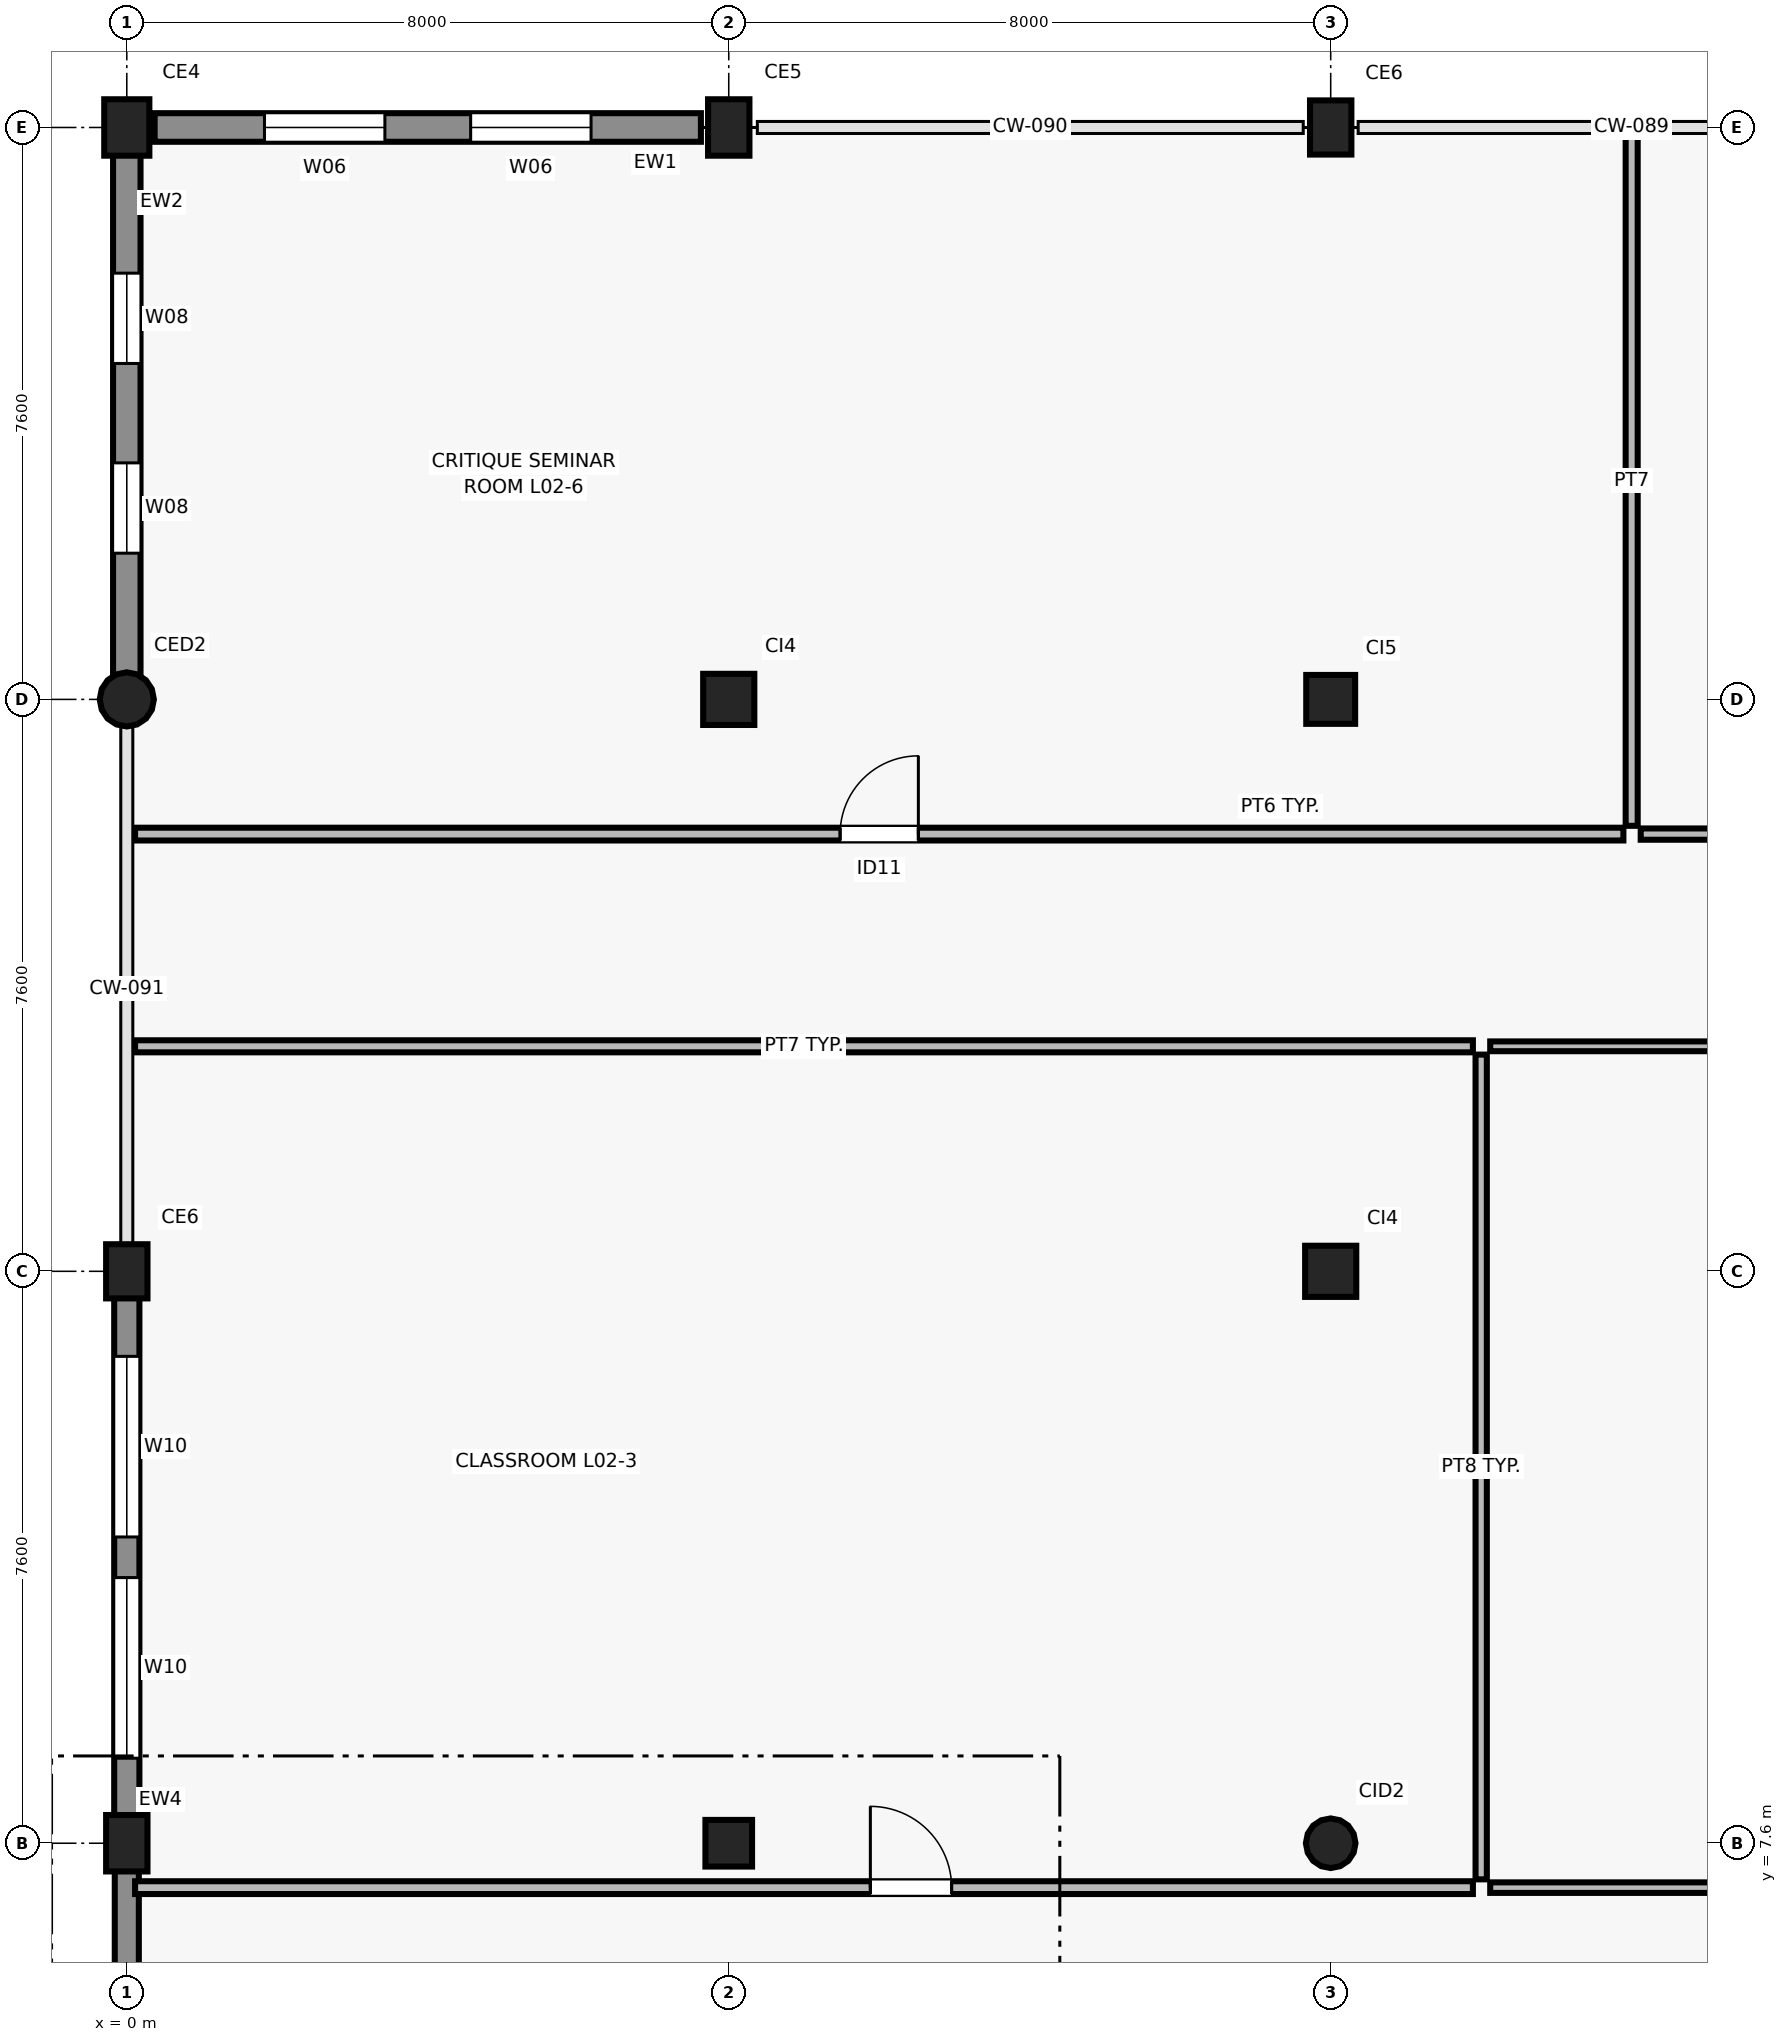
"""IFC4 building model, lengths in metres.
Left out: names, types, materials, properties, quantities, classifications, styles, units other than length and angle.
Written with IfcOpenShell. Run it as: python <this file> out.ifc"""

import sys

from ifc_helpers import new_model, si_unit, direction, frame, frame_2d, origin, origin_2d, place, context, subcontext, project, spatial, rectangle, circle, extrude, element, fill, save


model = new_model("IFC4")
c1 = context("Model", 3, precision=1e-05, world=origin(), true_north=direction((0.0, 1.0)))
c2 = subcontext(c1, "Body", "Model", "MODEL_VIEW")
j1 = project(units=[si_unit("LENGTHUNIT", "METRE"), si_unit("PLANEANGLEUNIT", "RADIAN")], contexts=[c1])
p1 = place(None, origin())
s1 = spatial("IfcSite", under=j1, at=p1, CompositionType="ELEMENT")
p2 = place(p1, origin())
s2 = spatial("IfcBuilding", under=s1, at=p2, CompositionType="ELEMENT")
p3 = place(p2, frame((0.0, 0.0, 9.0)))
s3 = spatial("IfcBuildingStorey", under=s2, at=p3, CompositionType="ELEMENT", Elevation=9.0)
p4 = place(p3, frame((0.0, 7.6, 0.0), z_axis=(0.0, 0.0, 1.0), x_axis=(1.0, 0.0, 0.0)))
e1 = element("IfcColumn", 1, at=p4, inside=s3, PredefinedType="COLUMN", context=c2, shape_type="SweptSolid", body=[
    extrude(rectangle(XDim=0.75, YDim=0.55, at=origin_2d()), origin(), (0.0, 0.0, 1.0), 4.2),
])
p5 = place(p3, frame((0.0, 15.2, 0.0), z_axis=(0.0, 0.0, 1.0), x_axis=(1.0, 0.0, 0.0)))
e2 = element("IfcColumn", 2, at=p5, inside=s3, PredefinedType="COLUMN", context=c2, shape_type="SweptSolid", body=[
    extrude(rectangle(XDim=0.72, YDim=0.55, at=origin_2d()), origin(), (0.0, 0.0, 1.0), 4.2),
])
p6 = place(p3, frame((0.0, 22.8, 0.0), z_axis=(0.0, 0.0, 1.0), x_axis=(1.0, 0.0, 0.0)))
e3 = element("IfcColumn", 3, at=p6, inside=s3, PredefinedType="COLUMN", context=c2, shape_type="SweptSolid", body=[
    extrude(circle(Radius=0.36, at=origin_2d()), origin(), (0.0, 0.0, 1.0), 4.2),
])
p7 = place(p3, frame((0.0, 30.4, 0.0), z_axis=(0.0, 0.0, 1.0), x_axis=(1.0, 0.0, 0.0)))
e4 = element("IfcColumn", 4, at=p7, inside=s3, PredefinedType="COLUMN", context=c2, shape_type="SweptSolid", body=[
    extrude(rectangle(XDim=0.75, YDim=0.6, at=origin_2d()), origin(), (0.0, 0.0, 1.0), 4.2),
])
p8 = place(p3, frame((8.0, 7.6, 0.0), z_axis=(0.0, 0.0, 1.0), x_axis=(1.0, 0.0, 0.0)))
e5 = element("IfcColumn", 5, at=p8, inside=s3, PredefinedType="COLUMN", context=c2, shape_type="SweptSolid", body=[
    extrude(rectangle(XDim=0.62, YDim=0.62, at=origin_2d()), origin(), (0.0, 0.0, 1.0), 4.2),
])
p9 = place(p3, frame((8.0, 22.8, 0.0), z_axis=(0.0, 0.0, 1.0), x_axis=(1.0, 0.0, 0.0)))
e6 = element("IfcColumn", 6, at=p9, inside=s3, PredefinedType="COLUMN", context=c2, shape_type="SweptSolid", body=[
    extrude(rectangle(XDim=0.68, YDim=0.68, at=origin_2d()), origin(), (0.0, 0.0, 1.0), 4.2),
])
p10 = place(p3, frame((8.0, 30.4, 0.0), z_axis=(0.0, 0.0, 1.0), x_axis=(1.0, 0.0, 0.0)))
e7 = element("IfcColumn", 7, at=p10, inside=s3, PredefinedType="COLUMN", context=c2, shape_type="SweptSolid", body=[
    extrude(rectangle(XDim=0.75, YDim=0.55, at=origin_2d()), origin(), (0.0, 0.0, 1.0), 4.2),
])
p11 = place(p3, frame((16.0, 7.6, 0.0), z_axis=(0.0, 0.0, 1.0), x_axis=(1.0, 0.0, 0.0)))
e8 = element("IfcColumn", 8, at=p11, inside=s3, PredefinedType="COLUMN", context=c2, shape_type="SweptSolid", body=[
    extrude(circle(Radius=0.33, at=origin_2d()), origin(), (0.0, 0.0, 1.0), 4.2),
])
p12 = place(p3, frame((16.0, 15.2, 0.0), z_axis=(0.0, 0.0, 1.0), x_axis=(1.0, 0.0, 0.0)))
e9 = element("IfcColumn", 9, at=p12, inside=s3, PredefinedType="COLUMN", context=c2, shape_type="SweptSolid", body=[
    extrude(rectangle(XDim=0.68, YDim=0.68, at=origin_2d()), origin(), (0.0, 0.0, 1.0), 4.2),
])
p13 = place(p3, frame((16.0, 22.8, 0.0), z_axis=(0.0, 0.0, 1.0), x_axis=(1.0, 0.0, 0.0)))
e10 = element("IfcColumn", 10, at=p13, inside=s3, PredefinedType="COLUMN", context=c2, shape_type="SweptSolid", body=[
    extrude(rectangle(XDim=0.65, YDim=0.65, at=origin_2d()), origin(), (0.0, 0.0, 1.0), 4.2),
])
p14 = place(p3, frame((16.0, 30.4, 0.0), z_axis=(0.0, 0.0, 1.0), x_axis=(1.0, 0.0, 0.0)))
e11 = element("IfcColumn", 11, at=p14, inside=s3, PredefinedType="COLUMN", context=c2, shape_type="SweptSolid", body=[
    extrude(rectangle(XDim=0.72, YDim=0.55, at=origin_2d()), origin(), (0.0, 0.0, 1.0), 4.2),
])
p15 = place(p3, frame((7.63, 30.4, 0.0), z_axis=(0.0, 0.0, 1.0), x_axis=(-1.0, 0.0, 0.0)))
e12 = element("IfcWall", 12, at=p15, inside=s3, PredefinedType="SOLIDWALL", context=c2, shape_type="SweptSolid", body=[
    extrude(rectangle(XDim=7.26, YDim=0.38, at=frame_2d((3.63, 0.0))), origin(), (0.0, 0.0, 1.0), 3.27),
])
p16 = place(p15, frame((1.46, 0.0, 0.9)))
e13 = element("IfcOpeningElement", 13, at=p16, cuts=e12, PredefinedType="OPENING", context=c2, shape_type="SweptSolid", body=[
    extrude(rectangle(XDim=1.6, YDim=1.8, at=frame_2d((0.8, 0.9))), frame((0.0, 0.2, 0.0), z_axis=(0.0, -1.0, 0.0), x_axis=(1.0, 0.0, 0.0)), (0.0, 0.0, 1.0), 0.4),
])
p17 = place(p15, frame((4.2, 0.0, 0.9)))
e14 = element("IfcOpeningElement", 14, at=p17, cuts=e12, PredefinedType="OPENING", context=c2, shape_type="SweptSolid", body=[
    extrude(rectangle(XDim=1.6, YDim=1.8, at=frame_2d((0.8, 0.9))), frame((0.0, 0.2, 0.0), z_axis=(0.0, -1.0, 0.0), x_axis=(1.0, 0.0, 0.0)), (0.0, 0.0, 1.0), 0.4),
])
p18 = place(p3, frame((0.0, 30.105, 0.0), z_axis=(0.0, 0.0, 1.0), x_axis=(0.0, -1.0, 0.0)))
e15 = element("IfcWall", 15, at=p18, inside=s3, PredefinedType="SOLIDWALL", context=c2, shape_type="SweptSolid", body=[
    extrude(rectangle(XDim=7.003, YDim=0.365, at=frame_2d((3.501, 0.0))), origin(), (0.0, 0.0, 1.0), 3.4),
])
p19 = place(p18, frame((1.641, 0.0, 0.9)))
e16 = element("IfcOpeningElement", 16, at=p19, cuts=e15, PredefinedType="OPENING", context=c2, shape_type="SweptSolid", body=[
    extrude(rectangle(XDim=1.2, YDim=1.8, at=frame_2d((0.6, 0.9))), frame((0.0, 0.192, 0.0), z_axis=(0.0, -1.0, 0.0), x_axis=(1.0, 0.0, 0.0)), (0.0, 0.0, 1.0), 0.385),
])
p20 = place(p18, frame((4.162, 0.0, 0.9)))
e17 = element("IfcOpeningElement", 17, at=p20, cuts=e15, PredefinedType="OPENING", context=c2, shape_type="SweptSolid", body=[
    extrude(rectangle(XDim=1.2, YDim=1.8, at=frame_2d((0.6, 0.9))), frame((0.0, 0.192, 0.0), z_axis=(0.0, -1.0, 0.0), x_axis=(1.0, 0.0, 0.0)), (0.0, 0.0, 1.0), 0.385),
])
p21 = place(p3, frame((0.0, 14.93, 0.0), z_axis=(0.0, 0.0, 1.0), x_axis=(0.0, -1.0, 0.0)))
e18 = element("IfcWall", 18, at=p21, inside=s3, PredefinedType="SOLIDWALL", context=c2, shape_type="SweptSolid", body=[
    extrude(rectangle(XDim=7.06, YDim=0.335, at=frame_2d((3.53, 0.0))), origin(), (0.0, 0.0, 1.0), 3.3),
])
p22 = place(p21, frame((0.86, 0.0, 0.9)))
e19 = element("IfcOpeningElement", 19, at=p22, cuts=e18, PredefinedType="OPENING", context=c2, shape_type="SweptSolid", body=[
    extrude(rectangle(XDim=2.4, YDim=1.5, at=frame_2d((1.2, 0.75))), frame((0.0, 0.177, 0.0), z_axis=(0.0, -1.0, 0.0), x_axis=(1.0, 0.0, 0.0)), (0.0, 0.0, 1.0), 0.355),
])
p23 = place(p21, frame((3.8, 0.0, 0.9)))
e20 = element("IfcOpeningElement", 20, at=p23, cuts=e18, PredefinedType="OPENING", context=c2, shape_type="SweptSolid", body=[
    extrude(rectangle(XDim=2.4, YDim=1.5, at=frame_2d((1.2, 0.75))), frame((0.0, 0.177, 0.0), z_axis=(0.0, -1.0, 0.0), x_axis=(1.0, 0.0, 0.0)), (0.0, 0.0, 1.0), 0.355),
])
p24 = place(p3, frame((0.0, 7.33, 0.0), z_axis=(0.0, 0.0, 1.0), x_axis=(0.0, -1.0, 0.0)))
e21 = element("IfcWall", 21, at=p24, inside=s3, PredefinedType="SOLIDWALL", context=c2, shape_type="SweptSolid", body=[
    extrude(rectangle(XDim=7.035, YDim=0.32, at=frame_2d((3.518, 0.0))), origin(), (0.0, 0.0, 1.0), 3.48),
])
p25 = place(p3, frame((0.11, 7.01, 0.0), z_axis=(0.0, 0.0, 1.0), x_axis=(1.0, 0.0, 0.0)))
e22 = element("IfcWall", 22, at=p25, inside=s3, PredefinedType="PARTITIONING", context=c2, shape_type="SweptSolid", body=[
    extrude(rectangle(XDim=17.78, YDim=0.17, at=frame_2d((8.89, 0.0))), origin(), (0.0, 0.0, 1.0), 3.9),
])
p26 = place(p25, frame((9.772, 0.0, 0.0)))
e23 = element("IfcOpeningElement", 23, at=p26, cuts=e22, PredefinedType="OPENING", context=c2, shape_type="SweptSolid", body=[
    extrude(rectangle(XDim=1.08, YDim=2.15, at=frame_2d((0.54, 1.075))), frame((0.0, 0.095, 0.0), z_axis=(0.0, -1.0, 0.0), x_axis=(1.0, 0.0, 0.0)), (0.0, 0.0, 1.0), 0.19),
])
p27 = place(p3, frame((0.11, 18.19, 0.0), z_axis=(0.0, 0.0, 1.0), x_axis=(1.0, 0.0, 0.0)))
e24 = element("IfcWall", 24, at=p27, inside=s3, PredefinedType="PARTITIONING", context=c2, shape_type="SweptSolid", body=[
    extrude(rectangle(XDim=17.78, YDim=0.16, at=frame_2d((8.89, 0.0))), origin(), (0.0, 0.0, 1.0), 3.9),
])
p28 = place(p3, frame((18.0, 7.12, 0.0), z_axis=(0.0, 0.0, 1.0), x_axis=(0.0, 1.0, 0.0)))
e25 = element("IfcWall", 25, at=p28, inside=s3, PredefinedType="PARTITIONING", context=c2, shape_type="SweptSolid", body=[
    extrude(rectangle(XDim=10.96, YDim=0.15, at=frame_2d((5.48, 0.0))), origin(), (0.0, 0.0, 1.0), 3.9),
])
p29 = place(p3, frame((18.12, 7.01, 0.0), z_axis=(0.0, 0.0, 1.0), x_axis=(1.0, 0.0, 0.0)))
e26 = element("IfcWall", 26, at=p29, inside=s3, PredefinedType="PARTITIONING", context=c2, shape_type="SweptSolid", body=[
    extrude(rectangle(XDim=17.16, YDim=0.14, at=frame_2d((8.58, 0.0))), origin(), (0.0, 0.0, 1.0), 3.9),
])
p30 = place(p29, frame((8.06, 0.0, 0.0)))
e27 = element("IfcOpeningElement", 27, at=p30, cuts=e26, PredefinedType="OPENING", context=c2, shape_type="SweptSolid", body=[
    extrude(rectangle(XDim=1.04, YDim=2.15, at=frame_2d((0.52, 1.075))), frame((0.0, 0.08, 0.0), z_axis=(0.0, -1.0, 0.0), x_axis=(1.0, 0.0, 0.0)), (0.0, 0.0, 1.0), 0.16),
])
p31 = place(p3, frame((18.12, 18.19, 0.0), z_axis=(0.0, 0.0, 1.0), x_axis=(1.0, 0.0, 0.0)))
e28 = element("IfcWall", 28, at=p31, inside=s3, PredefinedType="PARTITIONING", context=c2, shape_type="SweptSolid", body=[
    extrude(rectangle(XDim=17.16, YDim=0.13, at=frame_2d((8.58, 0.0))), origin(), (0.0, 0.0, 1.0), 3.9),
])
p32 = place(p3, frame((0.11, 21.01, 0.0), z_axis=(0.0, 0.0, 1.0), x_axis=(1.0, 0.0, 0.0)))
e29 = element("IfcWall", 29, at=p32, inside=s3, PredefinedType="PARTITIONING", context=c2, shape_type="SweptSolid", body=[
    extrude(rectangle(XDim=19.78, YDim=0.17, at=frame_2d((9.89, 0.0))), origin(), (0.0, 0.0, 1.0), 3.9),
])
p33 = place(p32, frame((9.37, 0.0, 0.0)))
e30 = element("IfcOpeningElement", 30, at=p33, cuts=e29, PredefinedType="OPENING", context=c2, shape_type="SweptSolid", body=[
    extrude(rectangle(XDim=1.04, YDim=2.15, at=frame_2d((0.52, 1.075))), frame((0.0, 0.095, 0.0), z_axis=(0.0, -1.0, 0.0), x_axis=(1.0, 0.0, 0.0)), (0.0, 0.0, 1.0), 0.19),
])
p34 = place(p3, frame((20.0, 21.12, 0.0), z_axis=(0.0, 0.0, 1.0), x_axis=(0.0, 1.0, 0.0)))
e31 = element("IfcWall", 31, at=p34, inside=s3, PredefinedType="PARTITIONING", context=c2, shape_type="SweptSolid", body=[
    extrude(rectangle(XDim=9.17, YDim=0.16, at=frame_2d((4.585, 0.0))), origin(), (0.0, 0.0, 1.0), 3.9),
])
p35 = place(p3, frame((20.12, 21.01, 0.0), z_axis=(0.0, 0.0, 1.0), x_axis=(1.0, 0.0, 0.0)))
e32 = element("IfcWall", 32, at=p35, inside=s3, PredefinedType="PARTITIONING", context=c2, shape_type="SweptSolid", body=[
    extrude(rectangle(XDim=15.16, YDim=0.15, at=frame_2d((7.58, 0.0))), origin(), (0.0, 0.0, 1.0), 3.9),
])
p36 = place(p35, frame((7.08, 0.0, 0.0)))
e33 = element("IfcOpeningElement", 33, at=p36, cuts=e32, PredefinedType="OPENING", context=c2, shape_type="SweptSolid", body=[
    extrude(rectangle(XDim=1.0, YDim=2.15, at=frame_2d((0.5, 1.075))), frame((0.0, 0.085, 0.0), z_axis=(0.0, -1.0, 0.0), x_axis=(1.0, 0.0, 0.0)), (0.0, 0.0, 1.0), 0.17),
])
p37 = place(p16, origin())
e34 = element("IfcWindow", 34, at=p37, inside=s3, PartitioningType="SINGLE_PANEL", PredefinedType="WINDOW", context=c2, shape_type="SweptSolid", body=[
    extrude(rectangle(XDim=1.6, YDim=1.8, at=frame_2d((0.8, 0.9))), frame((0.0, 0.03, 0.0), z_axis=(0.0, -1.0, 0.0), x_axis=(1.0, 0.0, 0.0)), (0.0, 0.0, 1.0), 0.06),
])
fill(e13, e34)
p38 = place(p17, origin())
e35 = element("IfcWindow", 35, at=p38, inside=s3, PartitioningType="SINGLE_PANEL", PredefinedType="WINDOW", context=c2, shape_type="SweptSolid", body=[
    extrude(rectangle(XDim=1.6, YDim=1.8, at=frame_2d((0.8, 0.9))), frame((0.0, 0.03, 0.0), z_axis=(0.0, -1.0, 0.0), x_axis=(1.0, 0.0, 0.0)), (0.0, 0.0, 1.0), 0.06),
])
fill(e14, e35)
p39 = place(p19, origin())
e36 = element("IfcWindow", 36, at=p39, inside=s3, PartitioningType="SINGLE_PANEL", PredefinedType="WINDOW", context=c2, shape_type="SweptSolid", body=[
    extrude(rectangle(XDim=1.2, YDim=1.8, at=frame_2d((0.6, 0.9))), frame((0.0, 0.03, 0.0), z_axis=(0.0, -1.0, 0.0), x_axis=(1.0, 0.0, 0.0)), (0.0, 0.0, 1.0), 0.06),
])
fill(e16, e36)
p40 = place(p20, origin())
e37 = element("IfcWindow", 37, at=p40, inside=s3, PartitioningType="SINGLE_PANEL", PredefinedType="WINDOW", context=c2, shape_type="SweptSolid", body=[
    extrude(rectangle(XDim=1.2, YDim=1.8, at=frame_2d((0.6, 0.9))), frame((0.0, 0.03, 0.0), z_axis=(0.0, -1.0, 0.0), x_axis=(1.0, 0.0, 0.0)), (0.0, 0.0, 1.0), 0.06),
])
fill(e17, e37)
p41 = place(p22, origin())
e38 = element("IfcWindow", 38, at=p41, inside=s3, PartitioningType="SINGLE_PANEL", PredefinedType="WINDOW", context=c2, shape_type="SweptSolid", body=[
    extrude(rectangle(XDim=2.4, YDim=1.5, at=frame_2d((1.2, 0.75))), frame((0.0, 0.03, 0.0), z_axis=(0.0, -1.0, 0.0), x_axis=(1.0, 0.0, 0.0)), (0.0, 0.0, 1.0), 0.06),
])
fill(e19, e38)
p42 = place(p23, origin())
e39 = element("IfcWindow", 39, at=p42, inside=s3, PartitioningType="SINGLE_PANEL", PredefinedType="WINDOW", context=c2, shape_type="SweptSolid", body=[
    extrude(rectangle(XDim=2.4, YDim=1.5, at=frame_2d((1.2, 0.75))), frame((0.0, 0.03, 0.0), z_axis=(0.0, -1.0, 0.0), x_axis=(1.0, 0.0, 0.0)), (0.0, 0.0, 1.0), 0.06),
])
fill(e20, e39)
p43 = place(p26, origin())
e40 = element("IfcDoor", 40, at=p43, inside=s3, OperationType="SINGLE_SWING_LEFT", PredefinedType="DOOR", context=c2, shape_type="SweptSolid", body=[
    extrude(rectangle(XDim=1.08, YDim=2.15, at=frame_2d((0.54, 1.075))), frame((0.0, 0.025, 0.0), z_axis=(0.0, -1.0, 0.0), x_axis=(1.0, 0.0, 0.0)), (0.0, 0.0, 1.0), 0.05),
])
fill(e23, e40)
p44 = place(p33, origin())
e41 = element("IfcDoor", 41, at=p44, inside=s3, OperationType="SINGLE_SWING_RIGHT", PredefinedType="DOOR", context=c2, shape_type="SweptSolid", body=[
    extrude(rectangle(XDim=1.04, YDim=2.15, at=frame_2d((0.52, 1.075))), frame((0.0, 0.025, 0.0), z_axis=(0.0, -1.0, 0.0), x_axis=(1.0, 0.0, 0.0)), (0.0, 0.0, 1.0), 0.05),
])
fill(e30, e41)
save(model, sys.argv[1])
